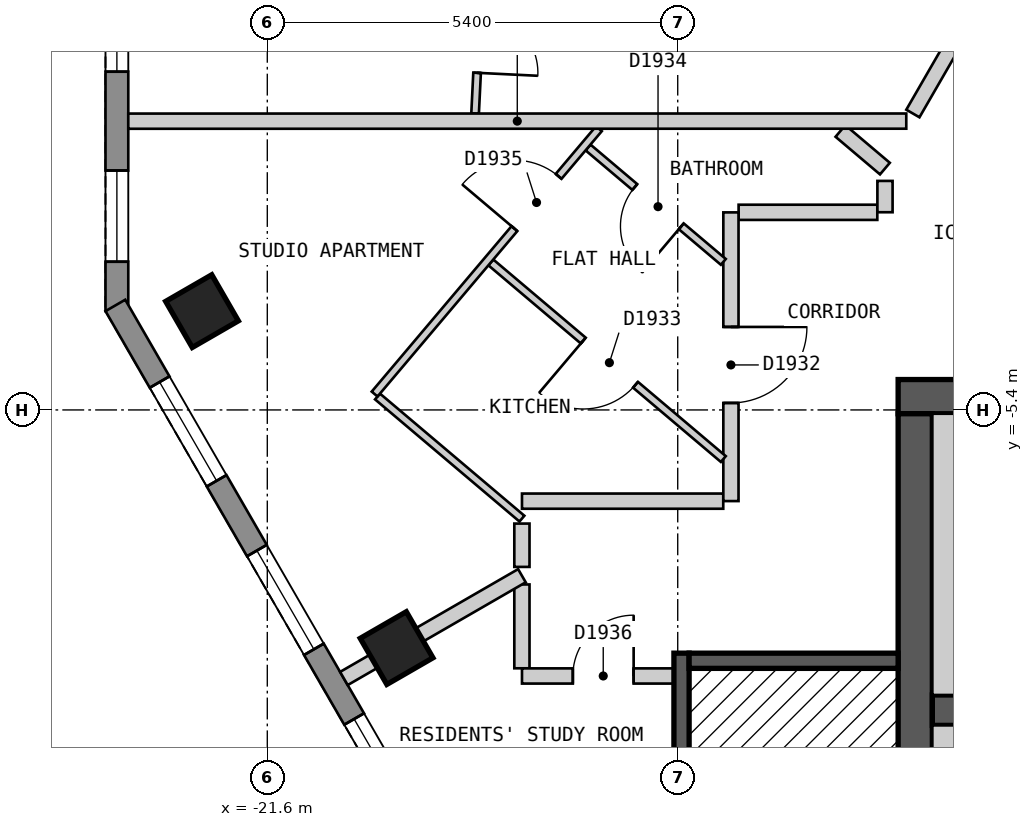
"""IFC4 building model, lengths in metres.
Left out: names, types, materials, properties, quantities, classifications, styles, units other than length and angle.
Written with IfcOpenShell. Run it as: python <this file> out.ifc"""

import sys

from ifc_helpers import new_model, si_unit, direction, frame, frame_2d, origin, origin_2d, place, context, subcontext, project, spatial, polyline, rectangle, outline, extrude, element, fill, save


model = new_model("IFC4")
c1 = context("Model", 3, precision=1e-05, world=origin(), true_north=direction((0.0, 1.0)))
c2 = subcontext(c1, "Body", "Model", "MODEL_VIEW")
j1 = project(units=[si_unit("LENGTHUNIT", "METRE"), si_unit("PLANEANGLEUNIT", "RADIAN")], contexts=[c1])
p1 = place(None, origin())
s1 = spatial("IfcSite", under=j1, at=p1, CompositionType="ELEMENT")
p2 = place(p1, origin())
s2 = spatial("IfcBuilding", under=s1, at=p2, CompositionType="ELEMENT")
p3 = place(p2, frame((0.0, 0.0, 220.8)))
s3 = spatial("IfcBuildingStorey", under=s2, at=p3, CompositionType="ELEMENT", Elevation=220.8)
for number, where, z_axis, x_axis in (
    (1, (-22.459, -4.1, 0.0), (0.0, 0.0, 1.0), (0.5, -0.866, 0.0)),
    (2, (-19.899, -8.533, 0.0), (0.0, 0.0, 1.0), (0.5, -0.866, 0.0)),
):
    element("IfcColumn", number, at=place(p3, frame(where, z_axis=z_axis, x_axis=x_axis)), inside=s3, PredefinedType="COLUMN", context=c2, shape_type="SweptSolid", body=[
        extrude(rectangle(XDim=0.7, YDim=0.7, at=origin_2d()), origin(), (0.0, 0.0, 1.0), 3.0),
    ])
p4 = place(p3, frame((-13.3, -5.225, 0.0), z_axis=(0.0, 0.0, 1.0), x_axis=(1.0, 0.0, 0.0)))
e3 = element("IfcWall", 3, at=p4, inside=s3, PredefinedType="SHEAR", context=c2, shape_type="SweptSolid", body=[
    extrude(rectangle(XDim=26.6, YDim=0.45, at=frame_2d((13.3, 0.0))), origin(), (0.0, 0.0, 1.0), 2.7),
])
p5 = place(p4, frame((23.65, 0.0, 0.0)))
e4 = element("IfcOpeningElement", 4, at=p5, cuts=e3, PredefinedType="OPENING", context=c2, shape_type="SweptSolid", body=[
    extrude(rectangle(XDim=1.2, YDim=2.1, at=frame_2d((0.6, 1.05))), frame((0.0, 0.235, 0.0), z_axis=(0.0, -1.0, 0.0), x_axis=(1.0, 0.0, 0.0)), (0.0, 0.0, 1.0), 0.47),
])
p6 = place(p3, frame((-13.075, -18.55, 0.0), z_axis=(0.0, 0.0, 1.0), x_axis=(0.0, 1.0, 0.0)))
e5 = element("IfcWall", 5, at=p6, inside=s3, PredefinedType="SHEAR", context=c2, shape_type="SweptSolid", body=[
    extrude(rectangle(XDim=13.1, YDim=0.45, at=frame_2d((6.55, 0.0))), origin(), (0.0, 0.0, 1.0), 2.7),
])
p7 = place(p6, frame((4.35, 0.0, 0.0)))
e6 = element("IfcOpeningElement", 6, at=p7, cuts=e5, PredefinedType="OPENING", context=c2, shape_type="SweptSolid", body=[
    extrude(rectangle(XDim=1.2, YDim=2.1, at=frame_2d((0.6, 1.05))), frame((0.0, 0.235, 0.0), z_axis=(0.0, -1.0, 0.0), x_axis=(1.0, 0.0, 0.0)), (0.0, 0.0, 1.0), 0.47),
])
p8 = place(p3, frame((-12.85, -9.35, 0.0), z_axis=(0.0, 0.0, 1.0), x_axis=(1.0, 0.0, 0.0)))
e7 = element("IfcWall", 7, at=p8, inside=s3, PredefinedType="SHEAR", context=c2, shape_type="SweptSolid", body=[
    extrude(rectangle(XDim=23.05, YDim=0.4, at=frame_2d((11.525, 0.0))), origin(), (0.0, 0.0, 1.0), 2.7),
])
p9 = place(p8, frame((1.45, 0.0, 0.0)))
e8 = element("IfcOpeningElement", 8, at=p9, cuts=e7, PredefinedType="OPENING", context=c2, shape_type="SweptSolid", body=[
    extrude(rectangle(XDim=1.1, YDim=2.1, at=frame_2d((0.55, 1.05))), frame((0.0, 0.21, 0.0), z_axis=(0.0, -1.0, 0.0), x_axis=(1.0, 0.0, 0.0)), (0.0, 0.0, 1.0), 0.42),
])
p10 = place(p8, frame((4.25, 0.0, 0.0)))
e9 = element("IfcOpeningElement", 9, at=p10, cuts=e7, PredefinedType="OPENING", context=c2, shape_type="SweptSolid", body=[
    extrude(rectangle(XDim=1.1, YDim=2.1, at=frame_2d((0.55, 1.05))), frame((0.0, 0.21, 0.0), z_axis=(0.0, -1.0, 0.0), x_axis=(1.0, 0.0, 0.0)), (0.0, 0.0, 1.0), 0.42),
])
p11 = place(p8, frame((7.05, 0.0, 0.0)))
e10 = element("IfcOpeningElement", 10, at=p11, cuts=e7, PredefinedType="OPENING", context=c2, shape_type="SweptSolid", body=[
    extrude(rectangle(XDim=1.1, YDim=2.1, at=frame_2d((0.55, 1.05))), frame((0.0, 0.21, 0.0), z_axis=(0.0, -1.0, 0.0), x_axis=(1.0, 0.0, 0.0)), (0.0, 0.0, 1.0), 0.42),
])
p12 = place(p8, frame((9.35, 0.0, 0.0)))
e11 = element("IfcOpeningElement", 11, at=p12, cuts=e7, PredefinedType="OPENING", context=c2, shape_type="SweptSolid", body=[
    extrude(rectangle(XDim=1.1, YDim=2.1, at=frame_2d((0.55, 1.05))), frame((0.0, 0.21, 0.0), z_axis=(0.0, -1.0, 0.0), x_axis=(1.0, 0.0, 0.0)), (0.0, 0.0, 1.0), 0.42),
])
p13 = place(p8, frame((11.65, 0.0, 0.0)))
e12 = element("IfcOpeningElement", 12, at=p13, cuts=e7, PredefinedType="OPENING", context=c2, shape_type="SweptSolid", body=[
    extrude(rectangle(XDim=1.1, YDim=2.1, at=frame_2d((0.55, 1.05))), frame((0.0, 0.21, 0.0), z_axis=(0.0, -1.0, 0.0), x_axis=(1.0, 0.0, 0.0)), (0.0, 0.0, 1.0), 0.42),
])
p14 = place(p8, frame((13.95, 0.0, 0.0)))
e13 = element("IfcOpeningElement", 13, at=p14, cuts=e7, PredefinedType="OPENING", context=c2, shape_type="SweptSolid", body=[
    extrude(rectangle(XDim=1.1, YDim=2.1, at=frame_2d((0.55, 1.05))), frame((0.0, 0.21, 0.0), z_axis=(0.0, -1.0, 0.0), x_axis=(1.0, 0.0, 0.0)), (0.0, 0.0, 1.0), 0.42),
])
p15 = place(p8, frame((16.25, 0.0, 0.0)))
e14 = element("IfcOpeningElement", 14, at=p15, cuts=e7, PredefinedType="OPENING", context=c2, shape_type="SweptSolid", body=[
    extrude(rectangle(XDim=1.1, YDim=2.1, at=frame_2d((0.55, 1.05))), frame((0.0, 0.21, 0.0), z_axis=(0.0, -1.0, 0.0), x_axis=(1.0, 0.0, 0.0)), (0.0, 0.0, 1.0), 0.42),
])
p16 = place(p8, frame((18.55, 0.0, 0.0)))
e15 = element("IfcOpeningElement", 15, at=p16, cuts=e7, PredefinedType="OPENING", context=c2, shape_type="SweptSolid", body=[
    extrude(rectangle(XDim=1.1, YDim=2.1, at=frame_2d((0.55, 1.05))), frame((0.0, 0.21, 0.0), z_axis=(0.0, -1.0, 0.0), x_axis=(1.0, 0.0, 0.0)), (0.0, 0.0, 1.0), 0.42),
])
p17 = place(p8, frame((20.95, 0.0, 0.0)))
e16 = element("IfcOpeningElement", 16, at=p17, cuts=e7, PredefinedType="OPENING", context=c2, shape_type="SweptSolid", body=[
    extrude(rectangle(XDim=1.1, YDim=2.1, at=frame_2d((0.55, 1.05))), frame((0.0, 0.21, 0.0), z_axis=(0.0, -1.0, 0.0), x_axis=(1.0, 0.0, 0.0)), (0.0, 0.0, 1.0), 0.42),
])
p18 = place(p3, frame((-23.579, 0.9, 0.0), z_axis=(0.0, 0.0, 1.0), x_axis=(0.0, -1.0, 0.0)))
e17 = element("IfcWall", 17, at=p18, inside=s3, PredefinedType="SOLIDWALL", context=c2, shape_type="SweptSolid", body=[
    extrude(outline(polyline([(0.0, -0.15), (5.0, -0.15), (4.92, 0.15), (0.08, 0.15), (0.0, -0.15)])), origin(), (0.0, 0.0, 1.0), 2.7),
])
p19 = place(p18, frame((0.65, 0.0, 0.15)))
e18 = element("IfcOpeningElement", 18, at=p19, cuts=e17, PredefinedType="OPENING", context=c2, shape_type="SweptSolid", body=[
    extrude(rectangle(XDim=1.2, YDim=2.1, at=frame_2d((0.6, 1.05))), frame((0.0, 0.16, 0.0), z_axis=(0.0, -1.0, 0.0), x_axis=(1.0, 0.0, 0.0)), (0.0, 0.0, 1.0), 0.32),
])
p20 = place(p18, frame((3.15, 0.0, 0.15)))
e19 = element("IfcOpeningElement", 19, at=p20, cuts=e17, PredefinedType="OPENING", context=c2, shape_type="SweptSolid", body=[
    extrude(rectangle(XDim=1.2, YDim=2.1, at=frame_2d((0.6, 1.05))), frame((0.0, 0.16, 0.0), z_axis=(0.0, -1.0, 0.0), x_axis=(1.0, 0.0, 0.0)), (0.0, 0.0, 1.0), 0.32),
])
p21 = place(p3, frame((-23.599, -4.025, 0.0), z_axis=(0.0, 0.0, 1.0), x_axis=(0.500012653391, -0.866018098222, 0.0)))
e20 = element("IfcWall", 20, at=p21, inside=s3, PredefinedType="SOLIDWALL", context=c2, shape_type="SweptSolid", body=[
    extrude(outline(polyline([(0.0, -0.15), (16.628, -0.15), (16.548, 0.15), (0.08, 0.15), (0.0, -0.15)])), origin(), (0.0, 0.0, 1.0), 2.7),
])
p22 = place(p21, frame((1.164, 0.0, 0.15)))
e21 = element("IfcOpeningElement", 21, at=p22, cuts=e20, PredefinedType="OPENING", context=c2, shape_type="SweptSolid", body=[
    extrude(rectangle(XDim=1.5, YDim=2.1, at=frame_2d((0.75, 1.05))), frame((0.0, 0.16, 0.0), z_axis=(0.0, -1.0, 0.0), x_axis=(1.0, 0.0, 0.0)), (0.0, 0.0, 1.0), 0.32),
])
p23 = place(p21, frame((3.724, 0.0, 0.15)))
e22 = element("IfcOpeningElement", 22, at=p23, cuts=e20, PredefinedType="OPENING", context=c2, shape_type="SweptSolid", body=[
    extrude(rectangle(XDim=1.5, YDim=2.1, at=frame_2d((0.75, 1.05))), frame((0.0, 0.16, 0.0), z_axis=(0.0, -1.0, 0.0), x_axis=(1.0, 0.0, 0.0)), (0.0, 0.0, 1.0), 0.32),
])
p24 = place(p21, frame((6.283, 0.0, 0.15)))
e23 = element("IfcOpeningElement", 23, at=p24, cuts=e20, PredefinedType="OPENING", context=c2, shape_type="SweptSolid", body=[
    extrude(rectangle(XDim=1.5, YDim=2.1, at=frame_2d((0.75, 1.05))), frame((0.0, 0.16, 0.0), z_axis=(0.0, -1.0, 0.0), x_axis=(1.0, 0.0, 0.0)), (0.0, 0.0, 1.0), 0.32),
])
p25 = place(p21, frame((8.843, 0.0, 0.15)))
e24 = element("IfcOpeningElement", 24, at=p25, cuts=e20, PredefinedType="OPENING", context=c2, shape_type="SweptSolid", body=[
    extrude(rectangle(XDim=1.5, YDim=2.1, at=frame_2d((0.75, 1.05))), frame((0.0, 0.16, 0.0), z_axis=(0.0, -1.0, 0.0), x_axis=(1.0, 0.0, 0.0)), (0.0, 0.0, 1.0), 0.32),
])
p26 = place(p21, frame((11.403, 0.0, 0.15)))
e25 = element("IfcOpeningElement", 25, at=p26, cuts=e20, PredefinedType="OPENING", context=c2, shape_type="SweptSolid", body=[
    extrude(rectangle(XDim=1.5, YDim=2.1, at=frame_2d((0.75, 1.05))), frame((0.0, 0.16, 0.0), z_axis=(0.0, -1.0, 0.0), x_axis=(1.0, 0.0, 0.0)), (0.0, 0.0, 1.0), 0.32),
])
p27 = place(p21, frame((13.962, 0.0, 0.15)))
e26 = element("IfcOpeningElement", 26, at=p27, cuts=e20, PredefinedType="OPENING", context=c2, shape_type="SweptSolid", body=[
    extrude(rectangle(XDim=1.5, YDim=2.1, at=frame_2d((0.75, 1.05))), frame((0.0, 0.16, 0.0), z_axis=(0.0, -1.0, 0.0), x_axis=(1.0, 0.0, 0.0)), (0.0, 0.0, 1.0), 0.32),
])
p28 = place(p3, frame((-18.25, -7.696, 0.0), z_axis=(0.0, 0.0, 1.0), x_axis=(0.0, -1.0, 0.0)))
e27 = element("IfcWall", 27, at=p28, inside=s3, PredefinedType="PARTITIONING", context=c2, shape_type="SweptSolid", body=[
    extrude(rectangle(XDim=1.103, YDim=0.2, at=frame_2d((0.552, 0.0))), origin(), (0.0, 0.0, 1.0), 2.7),
])
p29 = place(p3, frame((-18.249, -6.6, 0.0), z_axis=(0.0, 0.0, 1.0), x_axis=(1.0, 0.0, 0.0)))
e28 = element("IfcWall", 28, at=p29, inside=s3, PredefinedType="PARTITIONING", context=c2, shape_type="SweptSolid", body=[
    extrude(rectangle(XDim=2.648, YDim=0.2, at=frame_2d((1.324, 0.0))), origin(), (0.0, 0.0, 1.0), 2.7),
])
p30 = place(p3, frame((-18.249, -8.9, 0.0), z_axis=(0.0, 0.0, 1.0), x_axis=(1.0, 0.0, 0.0)))
e29 = element("IfcWall", 29, at=p30, inside=s3, PredefinedType="PARTITIONING", context=c2, shape_type="SweptSolid", body=[
    extrude(rectangle(XDim=2.199, YDim=0.2, at=frame_2d((1.1, 0.0))), origin(), (0.0, 0.0, 1.0), 2.7),
])
p31 = place(p30, frame((0.669, 0.0, 0.0)))
e30 = element("IfcOpeningElement", 30, at=p31, cuts=e29, PredefinedType="OPENING", context=c2, shape_type="SweptSolid", body=[
    extrude(rectangle(XDim=0.8, YDim=2.1, at=frame_2d((0.4, 1.05))), frame((0.0, 0.11, 0.0), z_axis=(0.0, -1.0, 0.0), x_axis=(1.0, 0.0, 0.0)), (0.0, 0.0, 1.0), 0.22),
])
p32 = place(p3, frame((-15.399, -2.8, 0.0), z_axis=(0.0, 0.0, 1.0), x_axis=(1.0, 0.0, 0.0)))
e31 = element("IfcWall", 31, at=p32, inside=s3, PredefinedType="PARTITIONING", context=c2, shape_type="SweptSolid", body=[
    extrude(rectangle(XDim=1.825, YDim=0.2, at=frame_2d((0.913, 0.0))), origin(), (0.0, 0.0, 1.0), 2.7),
])
p33 = place(p3, frame((-13.106, -1.5, 0.0), z_axis=(0.0, 0.0, 1.0), x_axis=(0.500025705601, 0.86601056214, 0.0)))
e32 = element("IfcWall", 32, at=p33, inside=s3, PredefinedType="PARTITIONING", context=c2, shape_type="SweptSolid", body=[
    extrude(rectangle(XDim=7.735, YDim=0.2, at=frame_2d((3.868, 0.0))), origin(), (0.0, 0.0, 1.0), 2.7),
])
p34 = place(p3, frame((-13.473, -2.799, 0.0), z_axis=(0.0, 0.0, 1.0), x_axis=(0.0, 1.0, 0.0)))
e33 = element("IfcWall", 33, at=p34, inside=s3, PredefinedType="PARTITIONING", context=c2, shape_type="SweptSolid", body=[
    extrude(rectangle(XDim=0.412, YDim=0.2, at=frame_2d((0.206, 0.0))), origin(), (0.0, 0.0, 1.0), 2.7),
])
p35 = place(p3, frame((-15.5, -6.599, 0.0), z_axis=(0.0, 0.0, 1.0), x_axis=(0.0, 1.0, 0.0)))
e34 = element("IfcWall", 34, at=p35, inside=s3, PredefinedType="PARTITIONING", context=c2, shape_type="SweptSolid", body=[
    extrude(rectangle(XDim=3.798, YDim=0.2, at=frame_2d((1.899, 0.0))), origin(), (0.0, 0.0, 1.0), 2.7),
])
p36 = place(p35, frame((1.291, 0.0, 0.0)))
e35 = element("IfcOpeningElement", 35, at=p36, cuts=e34, PredefinedType="OPENING", context=c2, shape_type="SweptSolid", body=[
    extrude(rectangle(XDim=1.0, YDim=2.1, at=frame_2d((0.5, 1.05))), frame((0.0, 0.11, 0.0), z_axis=(0.0, -1.0, 0.0), x_axis=(1.0, 0.0, 0.0)), (0.0, 0.0, 1.0), 0.22),
])
p37 = place(p3, frame((-18.25, -7.465, 0.0), z_axis=(0.0, 0.0, 1.0), x_axis=(0.0, 1.0, 0.0)))
e36 = element("IfcWall", 36, at=p37, inside=s3, PredefinedType="PARTITIONING", context=c2, shape_type="SweptSolid", body=[
    extrude(rectangle(XDim=0.57, YDim=0.2, at=frame_2d((0.285, 0.0))), origin(), (0.0, 0.0, 1.0), 2.7),
])
p38 = place(p3, frame((-17.38, -1.947, 0.0), z_axis=(0.0, 0.0, 1.0), x_axis=(0.763616683524, -0.645669854217, 0.0)))
e37 = element("IfcWall", 37, at=p38, inside=s3, PredefinedType="PARTITIONING", context=c2, shape_type="SweptSolid", body=[
    extrude(rectangle(XDim=2.331, YDim=0.1, at=frame_2d((1.166, 0.0))), origin(), (0.0, 0.0, 1.0), 2.7),
])
p39 = place(p38, frame((0.806, 0.0, 0.0)))
e38 = element("IfcOpeningElement", 38, at=p39, cuts=e37, PredefinedType="OPENING", context=c2, shape_type="SweptSolid", body=[
    extrude(rectangle(XDim=0.8, YDim=2.1, at=frame_2d((0.4, 1.05))), frame((0.0, 0.06, 0.0), z_axis=(0.0, -1.0, 0.0), x_axis=(1.0, 0.0, 0.0)), (0.0, 0.0, 1.0), 0.12),
])
p40 = place(p3, frame((-18.659, -3.459, 0.0), z_axis=(0.0, 0.0, 1.0), x_axis=(0.763550385572, -0.64574825489, 0.0)))
e39 = element("IfcWall", 39, at=p40, inside=s3, PredefinedType="PARTITIONING", context=c2, shape_type="SweptSolid", body=[
    extrude(rectangle(XDim=4.006, YDim=0.1, at=frame_2d((2.003, 0.0))), origin(), (0.0, 0.0, 1.0), 2.7),
])
p41 = place(p40, frame((1.593, 0.0, 0.0)))
e40 = element("IfcOpeningElement", 40, at=p41, cuts=e39, PredefinedType="OPENING", context=c2, shape_type="SweptSolid", body=[
    extrude(rectangle(XDim=0.9, YDim=2.1, at=frame_2d((0.45, 1.05))), frame((0.0, 0.06, 0.0), z_axis=(0.0, -1.0, 0.0), x_axis=(1.0, 0.0, 0.0)), (0.0, 0.0, 1.0), 0.12),
])
p42 = place(p3, frame((-20.15, -5.223, 0.0), z_axis=(0.0, 0.0, 1.0), x_axis=(0.763471868926, -0.645841083672, 0.0)))
e41 = element("IfcWall", 41, at=p42, inside=s3, PredefinedType="PARTITIONING", context=c2, shape_type="SweptSolid", body=[
    extrude(rectangle(XDim=2.489, YDim=0.1, at=frame_2d((1.244, 0.0))), origin(), (0.0, 0.0, 1.0), 2.7),
])
p43 = place(p3, frame((-20.188, -5.191, 0.0), z_axis=(0.0, 0.0, 1.0), x_axis=(0.645563873658, 0.763706281909, 0.0)))
e42 = element("IfcWall", 42, at=p43, inside=s3, PredefinedType="PARTITIONING", context=c2, shape_type="SweptSolid", body=[
    extrude(rectangle(XDim=4.571, YDim=0.1, at=frame_2d((2.286, 0.0))), origin(), (0.0, 0.0, 1.0), 2.7),
])
p44 = place(p43, frame((2.85, 0.0, 0.0)))
e43 = element("IfcOpeningElement", 43, at=p44, cuts=e42, PredefinedType="OPENING", context=c2, shape_type="SweptSolid", body=[
    extrude(rectangle(XDim=0.9, YDim=2.1, at=frame_2d((0.45, 1.05))), frame((0.0, 0.06, 0.0), z_axis=(0.0, -1.0, 0.0), x_axis=(1.0, 0.0, 0.0)), (0.0, 0.0, 1.0), 0.12),
])
p45 = place(p3, frame((-18.866, -1.5, 0.0), z_axis=(0.0, 0.0, 1.0), x_axis=(0.048923533446, 0.998802526967, 0.0)))
e44 = element("IfcWall", 44, at=p45, inside=s3, PredefinedType="PARTITIONING", context=c2, shape_type="SweptSolid", body=[
    extrude(rectangle(XDim=1.921, YDim=0.1, at=frame_2d((0.96, 0.0))), origin(), (0.0, 0.0, 1.0), 2.7),
])
p46 = place(p45, frame((0.536, 0.0, 0.0)))
e45 = element("IfcOpeningElement", 45, at=p46, cuts=e44, PredefinedType="OPENING", context=c2, shape_type="SweptSolid", body=[
    extrude(rectangle(XDim=0.8, YDim=2.1, at=frame_2d((0.4, 1.05))), frame((0.0, 0.06, 0.0), z_axis=(0.0, -1.0, 0.0), x_axis=(1.0, 0.0, 0.0)), (0.0, 0.0, 1.0), 0.12),
])
p47 = place(p3, frame((-14.059, -1.73, 0.0), z_axis=(0.0, 0.0, 1.0), x_axis=(0.763289607824, -0.64605647941, 0.0)))
e46 = element("IfcWall", 46, at=p47, inside=s3, PredefinedType="PARTITIONING", context=c2, shape_type="SweptSolid", body=[
    extrude(rectangle(XDim=0.766, YDim=0.2, at=frame_2d((0.383, 0.0))), origin(), (0.0, 0.0, 1.0), 2.7),
])
p48 = place(p3, frame((-23.429, -1.601, 0.0), z_axis=(0.0, 0.0, 1.0), x_axis=(0.999999995449, 9.5406191e-05, 0.0)))
e47 = element("IfcWall", 47, at=p48, inside=s3, PredefinedType="PARTITIONING", context=c2, shape_type="SweptSolid", body=[
    extrude(rectangle(XDim=10.236, YDim=0.2, at=frame_2d((5.118, 0.0))), origin(), (0.0, 0.0, 1.0), 2.7),
])
p49 = place(p3, frame((-20.592, -8.933, 0.0), z_axis=(0.0, 0.0, 1.0), x_axis=(0.866045775131, 0.499964714133, 0.0)))
e48 = element("IfcWall", 48, at=p49, inside=s3, PredefinedType="PARTITIONING", context=c2, shape_type="SweptSolid", body=[
    extrude(rectangle(XDim=2.704, YDim=0.2, at=frame_2d((1.352, 0.0))), origin(), (0.0, 0.0, 1.0), 2.7),
])
p50 = place(p3, frame((-16.15, -14.4, 0.0), z_axis=(0.0, 0.0, 1.0), x_axis=(0.0, 1.0, 0.0)))
e49 = element("IfcWall", 49, at=p50, inside=s3, PredefinedType="SOLIDWALL", context=c2, shape_type="SweptSolid", body=[
    extrude(rectangle(XDim=5.8, YDim=0.2, at=frame_2d((2.9, 0.0))), origin(), (0.0, 0.0, 1.0), 2.7),
])
p51 = place(p3, frame((-16.05, -8.7, 0.0), z_axis=(0.0, 0.0, 1.0), x_axis=(1.0, 0.0, 0.0)))
e50 = element("IfcWall", 50, at=p51, inside=s3, PredefinedType="SOLIDWALL", context=c2, shape_type="SweptSolid", body=[
    extrude(rectangle(XDim=2.75, YDim=0.2, at=frame_2d((1.375, 0.0))), origin(), (0.0, 0.0, 1.0), 2.7),
])
p52 = place(p3, frame((-12.475, -13.0, 0.0), z_axis=(0.0, 0.0, 1.0), x_axis=(0.0, 1.0, 0.0)))
e51 = element("IfcWall", 51, at=p52, inside=s3, PredefinedType="PARTITIONING", context=c2, shape_type="SweptSolid", body=[
    extrude(rectangle(XDim=3.45, YDim=0.75, at=frame_2d((1.725, 0.0))), origin(), (0.0, 0.0, 1.0), 2.7),
])
p53 = place(p3, frame((-12.475, -9.15, 0.0), z_axis=(0.0, 0.0, 1.0), x_axis=(0.0, 1.0, 0.0)))
e52 = element("IfcWall", 52, at=p53, inside=s3, PredefinedType="SOLIDWALL", context=c2, shape_type="SweptSolid", body=[
    extrude(rectangle(XDim=3.7, YDim=0.75, at=frame_2d((1.85, 0.0))), origin(), (0.0, 0.0, 1.0), 2.7),
])
p54 = place(p19, origin())
e53 = element("IfcWindow", 53, at=p54, inside=s3, PartitioningType="SINGLE_PANEL", PredefinedType="WINDOW", context=c2, shape_type="SweptSolid", body=[
    extrude(rectangle(XDim=1.2, YDim=2.1, at=frame_2d((0.6, 1.05))), frame((0.0, 0.03, 0.0), z_axis=(0.0, -1.0, 0.0), x_axis=(1.0, 0.0, 0.0)), (0.0, 0.0, 1.0), 0.06),
])
fill(e18, e53)
p55 = place(p20, origin())
e54 = element("IfcWindow", 54, at=p55, inside=s3, PartitioningType="SINGLE_PANEL", PredefinedType="WINDOW", context=c2, shape_type="SweptSolid", body=[
    extrude(rectangle(XDim=1.2, YDim=2.1, at=frame_2d((0.6, 1.05))), frame((0.0, 0.03, 0.0), z_axis=(0.0, -1.0, 0.0), x_axis=(1.0, 0.0, 0.0)), (0.0, 0.0, 1.0), 0.06),
])
fill(e19, e54)
p56 = place(p22, origin())
e55 = element("IfcWindow", 55, at=p56, inside=s3, PartitioningType="SINGLE_PANEL", PredefinedType="WINDOW", context=c2, shape_type="SweptSolid", body=[
    extrude(rectangle(XDim=1.5, YDim=2.1, at=frame_2d((0.75, 1.05))), frame((0.0, 0.03, 0.0), z_axis=(0.0, -1.0, 0.0), x_axis=(1.0, 0.0, 0.0)), (0.0, 0.0, 1.0), 0.06),
])
fill(e21, e55)
p57 = place(p23, origin())
e56 = element("IfcWindow", 56, at=p57, inside=s3, PartitioningType="SINGLE_PANEL", PredefinedType="WINDOW", context=c2, shape_type="SweptSolid", body=[
    extrude(rectangle(XDim=1.5, YDim=2.1, at=frame_2d((0.75, 1.05))), frame((0.0, 0.03, 0.0), z_axis=(0.0, -1.0, 0.0), x_axis=(1.0, 0.0, 0.0)), (0.0, 0.0, 1.0), 0.06),
])
fill(e22, e56)
p58 = place(p24, origin())
e57 = element("IfcWindow", 57, at=p58, inside=s3, PartitioningType="SINGLE_PANEL", PredefinedType="WINDOW", context=c2, shape_type="SweptSolid", body=[
    extrude(rectangle(XDim=1.5, YDim=2.1, at=frame_2d((0.75, 1.05))), frame((0.0, 0.03, 0.0), z_axis=(0.0, -1.0, 0.0), x_axis=(1.0, 0.0, 0.0)), (0.0, 0.0, 1.0), 0.06),
])
fill(e23, e57)
p59 = place(p46, origin())
e58 = element("IfcDoor", 58, at=p59, inside=s3, OperationType="SINGLE_SWING_LEFT", PredefinedType="DOOR", context=c2, shape_type="SweptSolid", body=[
    extrude(rectangle(XDim=0.8, YDim=2.1, at=frame_2d((0.4, 1.05))), frame((0.0, 0.025, 0.0), z_axis=(0.0, -1.0, 0.0), x_axis=(1.0, 0.0, 0.0)), (0.0, 0.0, 1.0), 0.05),
])
fill(e45, e58)
p60 = place(p36, origin())
e59 = element("IfcDoor", 59, at=p60, inside=s3, OperationType="SINGLE_SWING_RIGHT", PredefinedType="DOOR", context=c2, shape_type="SweptSolid", body=[
    extrude(rectangle(XDim=1.0, YDim=2.1, at=frame_2d((0.5, 1.05))), frame((0.0, 0.025, 0.0), z_axis=(0.0, -1.0, 0.0), x_axis=(1.0, 0.0, 0.0)), (0.0, 0.0, 1.0), 0.05),
])
fill(e35, e59)
p61 = place(p41, origin())
e60 = element("IfcDoor", 60, at=p61, inside=s3, OperationType="SINGLE_SWING_LEFT", PredefinedType="DOOR", context=c2, shape_type="SweptSolid", body=[
    extrude(rectangle(XDim=0.9, YDim=2.1, at=frame_2d((0.45, 1.05))), frame((0.0, 0.025, 0.0), z_axis=(0.0, -1.0, 0.0), x_axis=(1.0, 0.0, 0.0)), (0.0, 0.0, 1.0), 0.05),
])
fill(e40, e60)
p62 = place(p39, origin())
e61 = element("IfcDoor", 61, at=p62, inside=s3, OperationType="SINGLE_SWING_RIGHT", PredefinedType="DOOR", context=c2, shape_type="SweptSolid", body=[
    extrude(rectangle(XDim=0.8, YDim=2.1, at=frame_2d((0.4, 1.05))), frame((0.0, 0.025, 0.0), z_axis=(0.0, -1.0, 0.0), x_axis=(1.0, 0.0, 0.0)), (0.0, 0.0, 1.0), 0.05),
])
fill(e38, e61)
p63 = place(p44, origin())
e62 = element("IfcDoor", 62, at=p63, inside=s3, OperationType="SINGLE_SWING_LEFT", PredefinedType="DOOR", context=c2, shape_type="SweptSolid", body=[
    extrude(rectangle(XDim=0.9, YDim=2.1, at=frame_2d((0.45, 1.05))), frame((0.0, 0.025, 0.0), z_axis=(0.0, -1.0, 0.0), x_axis=(1.0, 0.0, 0.0)), (0.0, 0.0, 1.0), 0.05),
])
fill(e43, e62)
p64 = place(p31, origin())
e63 = element("IfcDoor", 63, at=p64, inside=s3, OperationType="SINGLE_SWING_RIGHT", PredefinedType="DOOR", context=c2, shape_type="SweptSolid", body=[
    extrude(rectangle(XDim=0.8, YDim=2.1, at=frame_2d((0.4, 1.05))), frame((0.0, 0.025, 0.0), z_axis=(0.0, -1.0, 0.0), x_axis=(1.0, 0.0, 0.0)), (0.0, 0.0, 1.0), 0.05),
])
fill(e30, e63)
save(model, sys.argv[1])
